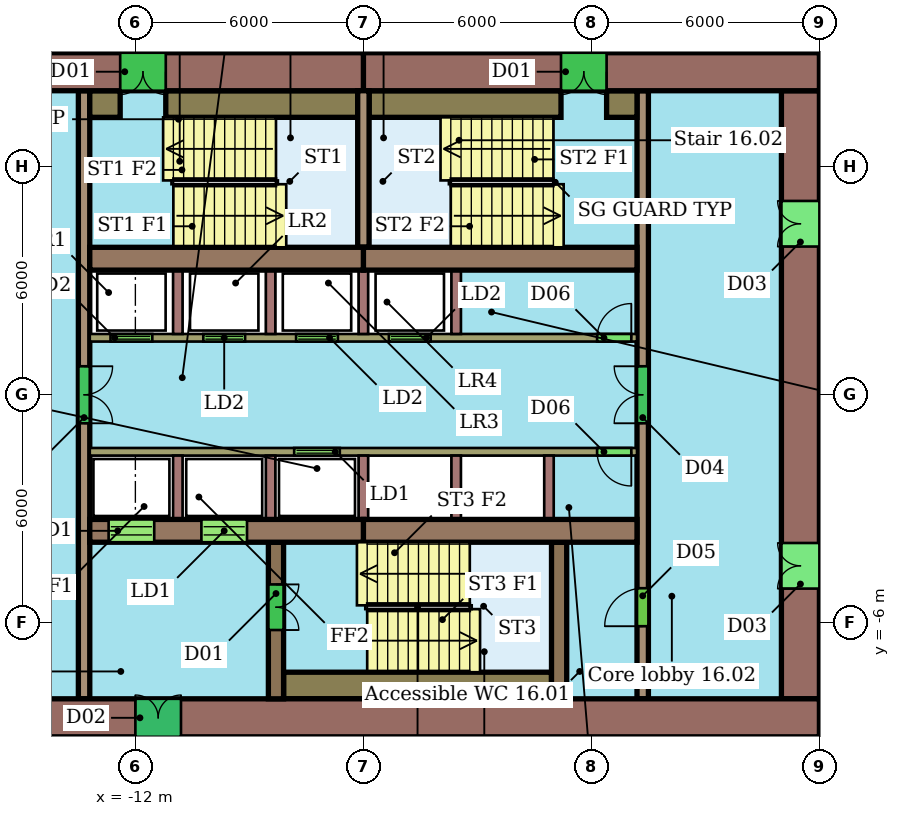
"""IFC4 building model, lengths in metres.
Left out: names, types, materials, properties, quantities, classifications, styles, units other than length and angle.
Written with IfcOpenShell. Run it as: python <this file> out.ifc"""

import sys

from ifc_helpers import new_model, si_unit, direction, frame, frame_2d, origin, place, context, subcontext, project, spatial, rectangle, extrude, element, fill, save


model = new_model("IFC4")
c1 = context("Model", 3, precision=1e-05, world=origin(), true_north=direction((0.0, 1.0)))
c2 = subcontext(c1, "Body", "Model", "MODEL_VIEW")
j1 = project(units=[si_unit("LENGTHUNIT", "METRE"), si_unit("PLANEANGLEUNIT", "RADIAN")], contexts=[c1])
p1 = place(None, origin())
s1 = spatial("IfcSite", under=j1, at=p1, CompositionType="ELEMENT")
p2 = place(p1, origin())
s2 = spatial("IfcBuilding", under=s1, at=p2, CompositionType="ELEMENT")
p3 = place(p2, frame((0.0, 0.0, 76.7)))
s3 = spatial("IfcBuildingStorey", under=s2, at=p3, CompositionType="ELEMENT", Elevation=76.7)
p4 = place(p3, frame((6.0, 8.5, 0.0), z_axis=(0.0, 0.0, 1.0), x_axis=(-1.0, 0.0, 0.0)))
e1 = element("IfcWall", 1, at=p4, inside=s3, PredefinedType="SHEAR", context=c2, shape_type="SweptSolid", body=[
    extrude(rectangle(XDim=12.0, YDim=1.0, at=frame_2d((6.0, 0.0))), origin(), (0.0, 0.0, 1.0), 3.4),
])
p5 = place(p4, frame((5.6, 0.0, 0.0)))
e2 = element("IfcOpeningElement", 2, at=p5, cuts=e1, PredefinedType="OPENING", context=c2, shape_type="SweptSolid", body=[
    extrude(rectangle(XDim=1.2, YDim=2.1, at=frame_2d((0.6, 1.05))), frame((0.0, 0.51, 0.0), z_axis=(0.0, -1.0, 0.0), x_axis=(1.0, 0.0, 0.0)), (0.0, 0.0, 1.0), 1.02),
])
p6 = place(p3, frame((-6.0, 8.5, 0.0), z_axis=(0.0, 0.0, 1.0), x_axis=(-1.0, 0.0, 0.0)))
e3 = element("IfcWall", 3, at=p6, inside=s3, PredefinedType="SHEAR", context=c2, shape_type="SweptSolid", body=[
    extrude(rectangle(XDim=12.0, YDim=1.0, at=frame_2d((6.0, 0.0))), origin(), (0.0, 0.0, 1.0), 3.4),
])
p7 = place(p6, frame((5.2, 0.0, 0.0)))
e4 = element("IfcOpeningElement", 4, at=p7, cuts=e3, PredefinedType="OPENING", context=c2, shape_type="SweptSolid", body=[
    extrude(rectangle(XDim=1.2, YDim=2.1, at=frame_2d((0.6, 1.05))), frame((0.0, 0.51, 0.0), z_axis=(0.0, -1.0, 0.0), x_axis=(1.0, 0.0, 0.0)), (0.0, 0.0, 1.0), 1.02),
])
p8 = place(p3, frame((-18.0, -8.5, 0.0), z_axis=(0.0, 0.0, 1.0), x_axis=(1.0, 0.0, 0.0)))
e5 = element("IfcWall", 5, at=p8, inside=s3, PredefinedType="SHEAR", context=c2, shape_type="SweptSolid", body=[
    extrude(rectangle(XDim=24.0, YDim=1.0, at=frame_2d((12.0, 0.0))), origin(), (0.0, 0.0, 1.0), 3.4),
])
p9 = place(p8, frame((6.0, 0.0, 0.0)))
e6 = element("IfcOpeningElement", 6, at=p9, cuts=e5, PredefinedType="OPENING", context=c2, shape_type="SweptSolid", body=[
    extrude(rectangle(XDim=1.2, YDim=2.1, at=frame_2d((0.6, 1.05))), frame((0.0, 0.51, 0.0), z_axis=(0.0, -1.0, 0.0), x_axis=(1.0, 0.0, 0.0)), (0.0, 0.0, 1.0), 1.02),
])
p10 = place(p3, frame((5.5, -8.0, 0.0), z_axis=(0.0, 0.0, 1.0), x_axis=(0.0, 1.0, 0.0)))
e7 = element("IfcWall", 7, at=p10, inside=s3, PredefinedType="SHEAR", context=c2, shape_type="SweptSolid", body=[
    extrude(rectangle(XDim=16.0, YDim=1.0, at=frame_2d((8.0, 0.0))), origin(), (0.0, 0.0, 1.0), 3.4),
])
p11 = place(p10, frame((2.9, 0.0, 0.0)))
e8 = element("IfcOpeningElement", 8, at=p11, cuts=e7, PredefinedType="OPENING", context=c2, shape_type="SweptSolid", body=[
    extrude(rectangle(XDim=1.2, YDim=2.1, at=frame_2d((0.6, 1.05))), frame((0.0, 0.51, 0.0), z_axis=(0.0, -1.0, 0.0), x_axis=(1.0, 0.0, 0.0)), (0.0, 0.0, 1.0), 1.02),
])
p12 = place(p10, frame((11.9, 0.0, 0.0)))
e9 = element("IfcOpeningElement", 9, at=p12, cuts=e7, PredefinedType="OPENING", context=c2, shape_type="SweptSolid", body=[
    extrude(rectangle(XDim=1.2, YDim=2.1, at=frame_2d((0.6, 1.05))), frame((0.0, 0.51, 0.0), z_axis=(0.0, -1.0, 0.0), x_axis=(1.0, 0.0, 0.0)), (0.0, 0.0, 1.0), 1.02),
])
for number, where, z_axis, x_axis in (
    (10, (-13.2, 3.58, 0.0), (0.0, 0.0, 1.0), (1.0, 0.0, 0.0)),
    (11, (-6.0, 3.58, 0.0), (0.0, 0.0, 1.0), (1.0, 0.0, 0.0)),
):
    element("IfcWall", number, at=place(p3, frame(where, z_axis=z_axis, x_axis=x_axis)), inside=s3, PredefinedType="SHEAR", context=c2, shape_type="SweptSolid", body=[
        extrude(rectangle(XDim=7.2, YDim=0.6, at=frame_2d((3.6, 0.0))), origin(), (0.0, 0.0, 1.0), 3.4),
    ])
p13 = place(p3, frame((-13.2, -3.58, 0.0), z_axis=(0.0, 0.0, 1.0), x_axis=(1.0, 0.0, 0.0)))
e12 = element("IfcWall", 12, at=p13, inside=s3, PredefinedType="SHEAR", context=c2, shape_type="SweptSolid", body=[
    extrude(rectangle(XDim=7.2, YDim=0.6, at=frame_2d((3.6, 0.0))), origin(), (0.0, 0.0, 1.0), 3.4),
])
p14 = place(p13, frame((0.496, 0.0, 0.0)))
e13 = element("IfcOpeningElement", 13, at=p14, cuts=e12, PredefinedType="OPENING", context=c2, shape_type="SweptSolid", body=[
    extrude(rectangle(XDim=1.2, YDim=2.1, at=frame_2d((0.6, 1.05))), frame((0.0, 0.31, 0.0), z_axis=(0.0, -1.0, 0.0), x_axis=(1.0, 0.0, 0.0)), (0.0, 0.0, 1.0), 0.62),
])
p15 = place(p13, frame((2.938, 0.0, 0.0)))
e14 = element("IfcOpeningElement", 14, at=p15, cuts=e12, PredefinedType="OPENING", context=c2, shape_type="SweptSolid", body=[
    extrude(rectangle(XDim=1.2, YDim=2.1, at=frame_2d((0.6, 1.05))), frame((0.0, 0.31, 0.0), z_axis=(0.0, -1.0, 0.0), x_axis=(1.0, 0.0, 0.0)), (0.0, 0.0, 1.0), 0.62),
])
p16 = place(p3, frame((-6.0, -3.58, 0.0), z_axis=(0.0, 0.0, 1.0), x_axis=(1.0, 0.0, 0.0)))
e15 = element("IfcWall", 15, at=p16, inside=s3, PredefinedType="SHEAR", context=c2, shape_type="SweptSolid", body=[
    extrude(rectangle(XDim=7.2, YDim=0.6, at=frame_2d((3.6, 0.0))), origin(), (0.0, 0.0, 1.0), 3.4),
])
p17 = place(p3, frame((-13.35, 8.0, 0.0), z_axis=(0.0, 0.0, 1.0), x_axis=(0.0, -1.0, 0.0)))
e16 = element("IfcWall", 16, at=p17, inside=s3, PredefinedType="SHEAR", context=c2, shape_type="SweptSolid", body=[
    extrude(rectangle(XDim=16.0, YDim=0.3, at=frame_2d((8.0, 0.0))), origin(), (0.0, 0.0, 1.0), 3.4),
])
p18 = place(p17, frame((7.25, 0.0, 0.0)))
e17 = element("IfcOpeningElement", 17, at=p18, cuts=e16, PredefinedType="OPENING", context=c2, shape_type="SweptSolid", body=[
    extrude(rectangle(XDim=1.5, YDim=2.1, at=frame_2d((0.75, 1.05))), frame((0.0, 0.16, 0.0), z_axis=(0.0, -1.0, 0.0), x_axis=(1.0, 0.0, 0.0)), (0.0, 0.0, 1.0), 0.32),
])
p19 = place(p3, frame((1.35, -8.0, 0.0), z_axis=(0.0, 0.0, 1.0), x_axis=(0.0, 1.0, 0.0)))
e18 = element("IfcWall", 18, at=p19, inside=s3, PredefinedType="SHEAR", context=c2, shape_type="SweptSolid", body=[
    extrude(rectangle(XDim=16.0, YDim=0.3, at=frame_2d((8.0, 0.0))), origin(), (0.0, 0.0, 1.0), 3.4),
])
p20 = place(p19, frame((1.91, 0.0, 0.0)))
e19 = element("IfcOpeningElement", 19, at=p20, cuts=e18, PredefinedType="OPENING", context=c2, shape_type="SweptSolid", body=[
    extrude(rectangle(XDim=1.0, YDim=2.1, at=frame_2d((0.5, 1.05))), frame((0.0, 0.16, 0.0), z_axis=(0.0, -1.0, 0.0), x_axis=(1.0, 0.0, 0.0)), (0.0, 0.0, 1.0), 0.32),
])
p21 = place(p19, frame((7.25, 0.0, 0.0)))
e20 = element("IfcOpeningElement", 20, at=p21, cuts=e18, PredefinedType="OPENING", context=c2, shape_type="SweptSolid", body=[
    extrude(rectangle(XDim=1.5, YDim=2.1, at=frame_2d((0.75, 1.05))), frame((0.0, 0.16, 0.0), z_axis=(0.0, -1.0, 0.0), x_axis=(1.0, 0.0, 0.0)), (0.0, 0.0, 1.0), 0.32),
])
p22 = place(p3, frame((-13.2, 1.5, 0.0), z_axis=(0.0, 0.0, 1.0), x_axis=(1.0, 0.0, 0.0)))
e21 = element("IfcWall", 21, at=p22, inside=s3, PredefinedType="SHEAR", context=c2, shape_type="SweptSolid", body=[
    extrude(rectangle(XDim=14.4, YDim=0.2, at=frame_2d((7.2, 0.0))), origin(), (0.0, 0.0, 1.0), 3.4),
])
p23 = place(p22, frame((0.546, 0.0, 0.0)))
e22 = element("IfcOpeningElement", 22, at=p23, cuts=e21, PredefinedType="OPENING", context=c2, shape_type="SweptSolid", body=[
    extrude(rectangle(XDim=1.1, YDim=2.1, at=frame_2d((0.55, 1.05))), frame((0.0, 0.11, 0.0), z_axis=(0.0, -1.0, 0.0), x_axis=(1.0, 0.0, 0.0)), (0.0, 0.0, 1.0), 0.22),
])
p24 = place(p22, frame((2.988, 0.0, 0.0)))
e23 = element("IfcOpeningElement", 23, at=p24, cuts=e21, PredefinedType="OPENING", context=c2, shape_type="SweptSolid", body=[
    extrude(rectangle(XDim=1.1, YDim=2.1, at=frame_2d((0.55, 1.05))), frame((0.0, 0.11, 0.0), z_axis=(0.0, -1.0, 0.0), x_axis=(1.0, 0.0, 0.0)), (0.0, 0.0, 1.0), 0.22),
])
p25 = place(p22, frame((5.429, 0.0, 0.0)))
e24 = element("IfcOpeningElement", 24, at=p25, cuts=e21, PredefinedType="OPENING", context=c2, shape_type="SweptSolid", body=[
    extrude(rectangle(XDim=1.1, YDim=2.1, at=frame_2d((0.55, 1.05))), frame((0.0, 0.11, 0.0), z_axis=(0.0, -1.0, 0.0), x_axis=(1.0, 0.0, 0.0)), (0.0, 0.0, 1.0), 0.22),
])
p26 = place(p22, frame((7.871, 0.0, 0.0)))
e25 = element("IfcOpeningElement", 25, at=p26, cuts=e21, PredefinedType="OPENING", context=c2, shape_type="SweptSolid", body=[
    extrude(rectangle(XDim=1.1, YDim=2.1, at=frame_2d((0.55, 1.05))), frame((0.0, 0.11, 0.0), z_axis=(0.0, -1.0, 0.0), x_axis=(1.0, 0.0, 0.0)), (0.0, 0.0, 1.0), 0.22),
])
p27 = place(p22, frame((13.35, 0.0, 0.0)))
e26 = element("IfcOpeningElement", 26, at=p27, cuts=e21, PredefinedType="OPENING", context=c2, shape_type="SweptSolid", body=[
    extrude(rectangle(XDim=0.9, YDim=2.1, at=frame_2d((0.45, 1.05))), frame((0.0, 0.11, 0.0), z_axis=(0.0, -1.0, 0.0), x_axis=(1.0, 0.0, 0.0)), (0.0, 0.0, 1.0), 0.22),
])
p28 = place(p3, frame((1.2, -1.5, 0.0), z_axis=(0.0, 0.0, 1.0), x_axis=(-1.0, 0.0, 0.0)))
e27 = element("IfcWall", 27, at=p28, inside=s3, PredefinedType="SHEAR", context=c2, shape_type="SweptSolid", body=[
    extrude(rectangle(XDim=14.4, YDim=0.2, at=frame_2d((7.2, 0.0))), origin(), (0.0, 0.0, 1.0), 3.4),
])
p29 = place(p28, frame((7.821, 0.0, 0.0)))
e28 = element("IfcOpeningElement", 28, at=p29, cuts=e27, PredefinedType="OPENING", context=c2, shape_type="SweptSolid", body=[
    extrude(rectangle(XDim=1.2, YDim=2.1, at=frame_2d((0.6, 1.05))), frame((0.0, 0.11, 0.0), z_axis=(0.0, -1.0, 0.0), x_axis=(1.0, 0.0, 0.0)), (0.0, 0.0, 1.0), 0.22),
])
p30 = place(p28, frame((0.15, 0.0, 0.0)))
e29 = element("IfcOpeningElement", 29, at=p30, cuts=e27, PredefinedType="OPENING", context=c2, shape_type="SweptSolid", body=[
    extrude(rectangle(XDim=0.9, YDim=2.1, at=frame_2d((0.45, 1.05))), frame((0.0, 0.11, 0.0), z_axis=(0.0, -1.0, 0.0), x_axis=(1.0, 0.0, 0.0)), (0.0, 0.0, 1.0), 0.22),
])
p31 = place(p3, frame((-8.3, -3.88, 0.0), z_axis=(0.0, 0.0, 1.0), x_axis=(0.0, -1.0, 0.0)))
e30 = element("IfcWall", 30, at=p31, inside=s3, PredefinedType="SHEAR", context=c2, shape_type="SweptSolid", body=[
    extrude(rectangle(XDim=4.12, YDim=0.4, at=frame_2d((2.06, 0.0))), origin(), (0.0, 0.0, 1.0), 3.4),
])
p32 = place(p31, frame((1.11, 0.0, 0.0)))
e31 = element("IfcOpeningElement", 31, at=p32, cuts=e30, PredefinedType="OPENING", context=c2, shape_type="SweptSolid", body=[
    extrude(rectangle(XDim=1.2, YDim=2.1, at=frame_2d((0.6, 1.05))), frame((0.0, 0.21, 0.0), z_axis=(0.0, -1.0, 0.0), x_axis=(1.0, 0.0, 0.0)), (0.0, 0.0, 1.0), 0.42),
])
p33 = place(p3, frame((-0.85, -3.88, 0.0), z_axis=(0.0, 0.0, 1.0), x_axis=(0.0, -1.0, 0.0)))
e32 = element("IfcWall", 32, at=p33, inside=s3, PredefinedType="SHEAR", context=c2, shape_type="SweptSolid", body=[
    extrude(rectangle(XDim=4.12, YDim=0.4, at=frame_2d((2.06, 0.0))), origin(), (0.0, 0.0, 1.0), 3.4),
])
p34 = place(p3, frame((-6.0, 3.88, 0.0), z_axis=(0.0, 0.0, 1.0), x_axis=(0.0, 1.0, 0.0)))
e33 = element("IfcWall", 33, at=p34, inside=s3, PredefinedType="SHEAR", context=c2, shape_type="SweptSolid", body=[
    extrude(rectangle(XDim=4.12, YDim=0.3, at=frame_2d((2.06, 0.0))), origin(), (0.0, 0.0, 1.0), 3.4),
])
p35 = place(p3, frame((-13.2, 7.65, 0.0), z_axis=(0.0, 0.0, 1.0), x_axis=(1.0, 0.0, 0.0)))
e34 = element("IfcWall", 34, at=p35, inside=s3, PredefinedType="SHEAR", context=c2, shape_type="SweptSolid", body=[
    extrude(rectangle(XDim=0.8, YDim=0.7, at=frame_2d((0.4, 0.0))), origin(), (0.0, 0.0, 1.0), 3.4),
])
for number, where, z_axis, x_axis in (
    (35, (-11.2, 7.65, 0.0), (0.0, 0.0, 1.0), (1.0, 0.0, 0.0)),
    (36, (-5.85, 7.65, 0.0), (0.0, 0.0, 1.0), (1.0, 0.0, 0.0)),
):
    element("IfcWall", number, at=place(p3, frame(where, z_axis=z_axis, x_axis=x_axis)), inside=s3, PredefinedType="SHEAR", context=c2, shape_type="SweptSolid", body=[
        extrude(rectangle(XDim=5.05, YDim=0.7, at=frame_2d((2.525, 0.0))), origin(), (0.0, 0.0, 1.0), 3.4),
    ])
p36 = place(p3, frame((0.4, 7.65, 0.0), z_axis=(0.0, 0.0, 1.0), x_axis=(1.0, 0.0, 0.0)))
e37 = element("IfcWall", 37, at=p36, inside=s3, PredefinedType="SHEAR", context=c2, shape_type="SweptSolid", body=[
    extrude(rectangle(XDim=0.8, YDim=0.7, at=frame_2d((0.4, 0.0))), origin(), (0.0, 0.0, 1.0), 3.4),
])
p37 = place(p3, frame((-8.1, -7.65, 0.0), z_axis=(0.0, 0.0, 1.0), x_axis=(1.0, 0.0, 0.0)))
e38 = element("IfcWall", 38, at=p37, inside=s3, PredefinedType="SHEAR", context=c2, shape_type="SweptSolid", body=[
    extrude(rectangle(XDim=7.05, YDim=0.7, at=frame_2d((3.525, 0.0))), origin(), (0.0, 0.0, 1.0), 3.4),
])
for number, where, z_axis, x_axis in (
    (39, (-10.883, 1.6, 0.0), (0.0, 0.0, 1.0), (0.0, 1.0, 0.0)),
    (40, (-8.442, 1.6, 0.0), (0.0, 0.0, 1.0), (0.0, 1.0, 0.0)),
    (41, (-6.0, 1.6, 0.0), (0.0, 0.0, 1.0), (0.0, 1.0, 0.0)),
    (42, (-3.558, 1.6, 0.0), (0.0, 0.0, 1.0), (0.0, 1.0, 0.0)),
    (43, (-10.883, -1.6, 0.0), (0.0, 0.0, 1.0), (0.0, -1.0, 0.0)),
    (44, (-8.442, -1.6, 0.0), (0.0, 0.0, 1.0), (0.0, -1.0, 0.0)),
    (45, (-6.0, -1.6, 0.0), (0.0, 0.0, 1.0), (0.0, -1.0, 0.0)),
    (46, (-3.558, -1.6, 0.0), (0.0, 0.0, 1.0), (0.0, -1.0, 0.0)),
    (47, (-1.117, -1.6, 0.0), (0.0, 0.0, 1.0), (0.0, -1.0, 0.0)),
):
    element("IfcWall", number, at=place(p3, frame(where, z_axis=z_axis, x_axis=x_axis)), inside=s3, PredefinedType="SHEAR", context=c2, shape_type="SweptSolid", body=[
        extrude(rectangle(XDim=1.68, YDim=0.25, at=frame_2d((0.84, 0.0))), origin(), (0.0, 0.0, 1.0), 3.4),
    ])
p38 = place(p5, origin())
e48 = element("IfcDoor", 48, at=p38, inside=s3, OperationType="DOUBLE_DOOR_SINGLE_SWING", PredefinedType="NOTDEFINED", context=c2, shape_type="SweptSolid", body=[
    extrude(rectangle(XDim=1.2, YDim=2.1, at=frame_2d((0.6, 1.05))), frame((0.0, 0.025, 0.0), z_axis=(0.0, -1.0, 0.0), x_axis=(1.0, 0.0, 0.0)), (0.0, 0.0, 1.0), 0.05),
])
fill(e2, e48)
p39 = place(p7, origin())
e49 = element("IfcDoor", 49, at=p39, inside=s3, OperationType="DOUBLE_DOOR_SINGLE_SWING", PredefinedType="NOTDEFINED", context=c2, shape_type="SweptSolid", body=[
    extrude(rectangle(XDim=1.2, YDim=2.1, at=frame_2d((0.6, 1.05))), frame((0.0, 0.025, 0.0), z_axis=(0.0, -1.0, 0.0), x_axis=(1.0, 0.0, 0.0)), (0.0, 0.0, 1.0), 0.05),
])
fill(e4, e49)
p40 = place(p9, origin())
e50 = element("IfcDoor", 50, at=p40, inside=s3, OperationType="DOUBLE_DOOR_SINGLE_SWING", PredefinedType="NOTDEFINED", context=c2, shape_type="SweptSolid", body=[
    extrude(rectangle(XDim=1.2, YDim=2.1, at=frame_2d((0.6, 1.05))), frame((0.0, 0.025, 0.0), z_axis=(0.0, -1.0, 0.0), x_axis=(1.0, 0.0, 0.0)), (0.0, 0.0, 1.0), 0.05),
])
fill(e6, e50)
p41 = place(p11, origin())
e51 = element("IfcDoor", 51, at=p41, inside=s3, OperationType="DOUBLE_DOOR_SINGLE_SWING", PredefinedType="NOTDEFINED", context=c2, shape_type="SweptSolid", body=[
    extrude(rectangle(XDim=1.2, YDim=2.1, at=frame_2d((0.6, 1.05))), frame((0.0, 0.025, 0.0), z_axis=(0.0, -1.0, 0.0), x_axis=(1.0, 0.0, 0.0)), (0.0, 0.0, 1.0), 0.05),
])
fill(e8, e51)
p42 = place(p12, origin())
e52 = element("IfcDoor", 52, at=p42, inside=s3, OperationType="DOUBLE_DOOR_SINGLE_SWING", PredefinedType="NOTDEFINED", context=c2, shape_type="SweptSolid", body=[
    extrude(rectangle(XDim=1.2, YDim=2.1, at=frame_2d((0.6, 1.05))), frame((0.0, 0.025, 0.0), z_axis=(0.0, -1.0, 0.0), x_axis=(1.0, 0.0, 0.0)), (0.0, 0.0, 1.0), 0.05),
])
fill(e9, e52)
p43 = place(p14, origin())
e53 = element("IfcDoor", 53, at=p43, inside=s3, OperationType="DOUBLE_DOOR_SLIDING", PredefinedType="NOTDEFINED", context=c2, shape_type="SweptSolid", body=[
    extrude(rectangle(XDim=1.2, YDim=2.1, at=frame_2d((0.6, 1.05))), frame((0.0, 0.025, 0.0), z_axis=(0.0, -1.0, 0.0), x_axis=(1.0, 0.0, 0.0)), (0.0, 0.0, 1.0), 0.05),
])
fill(e13, e53)
p44 = place(p15, origin())
e54 = element("IfcDoor", 54, at=p44, inside=s3, OperationType="DOUBLE_DOOR_SLIDING", PredefinedType="NOTDEFINED", context=c2, shape_type="SweptSolid", body=[
    extrude(rectangle(XDim=1.2, YDim=2.1, at=frame_2d((0.6, 1.05))), frame((0.0, 0.025, 0.0), z_axis=(0.0, -1.0, 0.0), x_axis=(1.0, 0.0, 0.0)), (0.0, 0.0, 1.0), 0.05),
])
fill(e14, e54)
p45 = place(p18, origin())
e55 = element("IfcDoor", 55, at=p45, inside=s3, OperationType="DOUBLE_DOOR_SINGLE_SWING", PredefinedType="NOTDEFINED", context=c2, shape_type="SweptSolid", body=[
    extrude(rectangle(XDim=1.5, YDim=2.1, at=frame_2d((0.75, 1.05))), frame((0.0, 0.025, 0.0), z_axis=(0.0, -1.0, 0.0), x_axis=(1.0, 0.0, 0.0)), (0.0, 0.0, 1.0), 0.05),
])
fill(e17, e55)
p46 = place(p20, origin())
e56 = element("IfcDoor", 56, at=p46, inside=s3, OperationType="SINGLE_SWING_LEFT", PredefinedType="NOTDEFINED", context=c2, shape_type="SweptSolid", body=[
    extrude(rectangle(XDim=1.0, YDim=2.1, at=frame_2d((0.5, 1.05))), frame((0.0, 0.025, 0.0), z_axis=(0.0, -1.0, 0.0), x_axis=(1.0, 0.0, 0.0)), (0.0, 0.0, 1.0), 0.05),
])
fill(e19, e56)
p47 = place(p21, origin())
e57 = element("IfcDoor", 57, at=p47, inside=s3, OperationType="DOUBLE_DOOR_SINGLE_SWING", PredefinedType="NOTDEFINED", context=c2, shape_type="SweptSolid", body=[
    extrude(rectangle(XDim=1.5, YDim=2.1, at=frame_2d((0.75, 1.05))), frame((0.0, 0.025, 0.0), z_axis=(0.0, -1.0, 0.0), x_axis=(1.0, 0.0, 0.0)), (0.0, 0.0, 1.0), 0.05),
])
fill(e20, e57)
p48 = place(p23, origin())
e58 = element("IfcDoor", 58, at=p48, inside=s3, OperationType="DOUBLE_DOOR_SLIDING", PredefinedType="NOTDEFINED", context=c2, shape_type="SweptSolid", body=[
    extrude(rectangle(XDim=1.1, YDim=2.1, at=frame_2d((0.55, 1.05))), frame((0.0, 0.025, 0.0), z_axis=(0.0, -1.0, 0.0), x_axis=(1.0, 0.0, 0.0)), (0.0, 0.0, 1.0), 0.05),
])
fill(e22, e58)
p49 = place(p24, origin())
e59 = element("IfcDoor", 59, at=p49, inside=s3, OperationType="DOUBLE_DOOR_SLIDING", PredefinedType="NOTDEFINED", context=c2, shape_type="SweptSolid", body=[
    extrude(rectangle(XDim=1.1, YDim=2.1, at=frame_2d((0.55, 1.05))), frame((0.0, 0.025, 0.0), z_axis=(0.0, -1.0, 0.0), x_axis=(1.0, 0.0, 0.0)), (0.0, 0.0, 1.0), 0.05),
])
fill(e23, e59)
p50 = place(p25, origin())
e60 = element("IfcDoor", 60, at=p50, inside=s3, OperationType="DOUBLE_DOOR_SLIDING", PredefinedType="NOTDEFINED", context=c2, shape_type="SweptSolid", body=[
    extrude(rectangle(XDim=1.1, YDim=2.1, at=frame_2d((0.55, 1.05))), frame((0.0, 0.025, 0.0), z_axis=(0.0, -1.0, 0.0), x_axis=(1.0, 0.0, 0.0)), (0.0, 0.0, 1.0), 0.05),
])
fill(e24, e60)
p51 = place(p26, origin())
e61 = element("IfcDoor", 61, at=p51, inside=s3, OperationType="DOUBLE_DOOR_SLIDING", PredefinedType="NOTDEFINED", context=c2, shape_type="SweptSolid", body=[
    extrude(rectangle(XDim=1.1, YDim=2.1, at=frame_2d((0.55, 1.05))), frame((0.0, 0.025, 0.0), z_axis=(0.0, -1.0, 0.0), x_axis=(1.0, 0.0, 0.0)), (0.0, 0.0, 1.0), 0.05),
])
fill(e25, e61)
p52 = place(p27, origin())
e62 = element("IfcDoor", 62, at=p52, inside=s3, OperationType="SINGLE_SWING_RIGHT", PredefinedType="NOTDEFINED", context=c2, shape_type="SweptSolid", body=[
    extrude(rectangle(XDim=0.9, YDim=2.1, at=frame_2d((0.45, 1.05))), frame((0.0, 0.025, 0.0), z_axis=(0.0, -1.0, 0.0), x_axis=(1.0, 0.0, 0.0)), (0.0, 0.0, 1.0), 0.05),
])
fill(e26, e62)
p53 = place(p29, origin())
e63 = element("IfcDoor", 63, at=p53, inside=s3, OperationType="DOUBLE_DOOR_SLIDING", PredefinedType="NOTDEFINED", context=c2, shape_type="SweptSolid", body=[
    extrude(rectangle(XDim=1.2, YDim=2.1, at=frame_2d((0.6, 1.05))), frame((0.0, 0.025, 0.0), z_axis=(0.0, -1.0, 0.0), x_axis=(1.0, 0.0, 0.0)), (0.0, 0.0, 1.0), 0.05),
])
fill(e28, e63)
p54 = place(p30, origin())
e64 = element("IfcDoor", 64, at=p54, inside=s3, OperationType="SINGLE_SWING_LEFT", PredefinedType="NOTDEFINED", context=c2, shape_type="SweptSolid", body=[
    extrude(rectangle(XDim=0.9, YDim=2.1, at=frame_2d((0.45, 1.05))), frame((0.0, 0.025, 0.0), z_axis=(0.0, -1.0, 0.0), x_axis=(1.0, 0.0, 0.0)), (0.0, 0.0, 1.0), 0.05),
])
fill(e29, e64)
p55 = place(p32, origin())
e65 = element("IfcDoor", 65, at=p55, inside=s3, OperationType="DOUBLE_DOOR_SINGLE_SWING", PredefinedType="NOTDEFINED", context=c2, shape_type="SweptSolid", body=[
    extrude(rectangle(XDim=1.2, YDim=2.1, at=frame_2d((0.6, 1.05))), frame((0.0, 0.025, 0.0), z_axis=(0.0, -1.0, 0.0), x_axis=(1.0, 0.0, 0.0)), (0.0, 0.0, 1.0), 0.05),
])
fill(e31, e65)
save(model, sys.argv[1])
